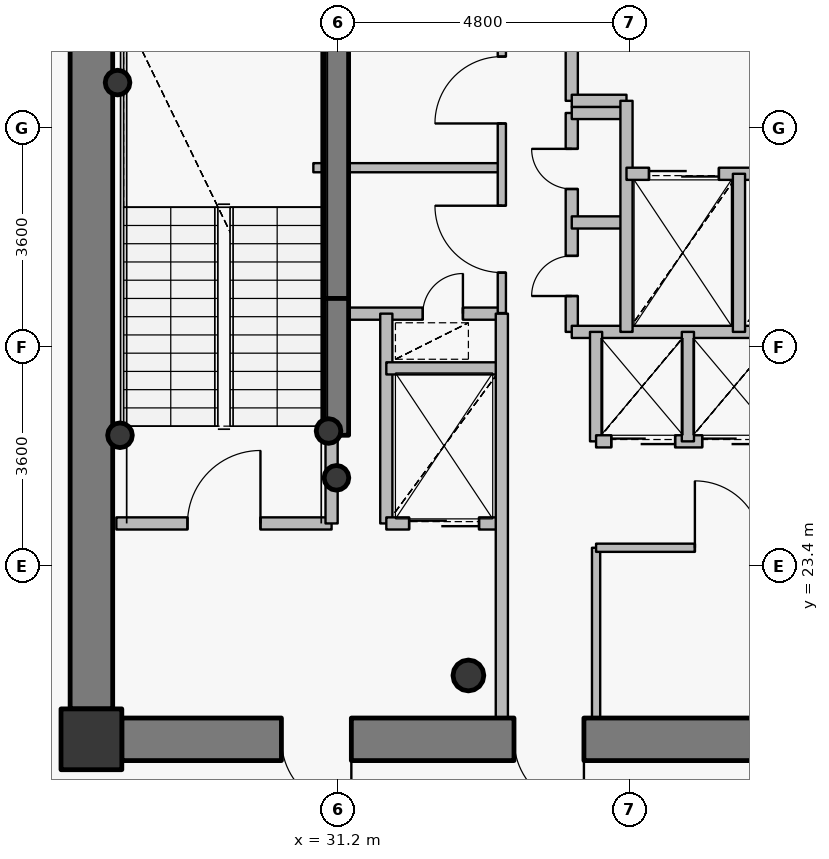
"""IFC4 building model, lengths in metres.
Left out: names, types, materials, properties, quantities, classifications, styles, units other than length and angle.
Written with IfcOpenShell. Run it as: python <this file> out.ifc"""

import sys

from ifc_helpers import new_model, si_unit, direction, frame, frame_2d, origin, origin_2d, place, context, subcontext, project, spatial, rectangle, hollow_circle, extrude, source, transform, mapped, element, fill, save


model = new_model("IFC4")
c1 = context("Model", 3, precision=1e-05, world=origin(), true_north=direction((0.0, 1.0)))
c2 = subcontext(c1, "Body", "Model", "MODEL_VIEW")
j1 = project(units=[si_unit("LENGTHUNIT", "METRE"), si_unit("PLANEANGLEUNIT", "RADIAN")], contexts=[c1])
p1 = place(None, origin())
s1 = spatial("IfcSite", under=j1, at=p1, CompositionType="ELEMENT")
p2 = place(p1, origin())
s2 = spatial("IfcBuilding", under=s1, at=p2, CompositionType="ELEMENT")
p3 = place(p2, frame((0.0, 0.0, 314.25)))
s3 = spatial("IfcBuildingStorey", under=s2, at=p3, CompositionType="ELEMENT", Elevation=314.25)
p4 = place(p3, frame((27.15, 20.55, 0.0), z_axis=(0.0, 0.0, 1.0), x_axis=(1.0, 0.0, 0.0)))
e1 = element("IfcColumn", 1, at=p4, inside=s3, PredefinedType="COLUMN", context=c2, shape_type="SweptSolid", body=[
    extrude(rectangle(XDim=1.0, YDim=1.0, at=origin_2d()), origin(), (0.0, 0.0, 1.0), 3.75),
])
p5 = place(p3, frame((33.35, 21.6, 0.0), z_axis=(0.0, 0.0, 1.0), x_axis=(1.0, 0.0, 0.0)))
e2 = element("IfcColumn", 2, at=p5, inside=s3, PredefinedType="COLUMN", context=c2, shape_type="SweptSolid", body=[
    extrude(hollow_circle(Radius=0.254, WallThickness=0.02, at=origin_2d()), origin(), (0.0, 0.0, 1.0), 3.75),
])
p6 = place(p3, frame((31.18, 27.8, 0.0), z_axis=(0.0, 0.0, 1.0), x_axis=(0.0, 1.0, 0.0)))
e3 = element("IfcWall", 3, at=p6, inside=s3, PredefinedType="SHEAR", context=c2, shape_type="SweptSolid", body=[
    extrude(rectangle(XDim=4.75, YDim=0.4, at=frame_2d((2.375, 0.0))), origin(), (0.0, 0.0, 1.0), 3.75),
])
for number, where, z_axis, x_axis in (
    (4, (27.58, 31.35, 0.0), (0.0, 0.0, 1.0), (1.0, 0.0, 0.0)),
    (5, (31.05, 25.62, 0.0), (0.0, 0.0, 1.0), (1.0, 0.0, 0.0)),
    (6, (31.18, 24.85, 0.0), (0.0, 0.0, 1.0), (1.0, 0.0, 0.0)),
    (7, (27.62, 25.55, 0.0), (0.0, 0.0, 1.0), (1.0, 0.0, 0.0)),
):
    element("IfcColumn", number, at=place(p3, frame(where, z_axis=z_axis, x_axis=x_axis)), inside=s3, PredefinedType="COLUMN", context=c2, shape_type="SweptSolid", body=[
        extrude(hollow_circle(Radius=0.203, WallThickness=0.016, at=origin_2d()), origin(), (0.0, 0.0, 1.0), 3.75),
    ])
p7 = place(p3, frame((44.35, 20.55, 0.0), z_axis=(0.0, 0.0, 1.0), x_axis=(-1.0, 0.0, 0.0)))
e8 = element("IfcWall", 8, at=p7, inside=s3, PredefinedType="SHEAR", context=c2, shape_type="SweptSolid", body=[
    extrude(rectangle(XDim=16.7, YDim=0.7, at=frame_2d((8.35, 0.0))), origin(), (0.0, 0.0, 1.0), 3.0),
])
p8 = place(p7, frame((12.925, 0.0, 0.0)))
e9 = element("IfcOpeningElement", 9, at=p8, cuts=e8, PredefinedType="OPENING", context=c2, shape_type="SweptSolid", body=[
    extrude(rectangle(XDim=1.15, YDim=2.15, at=origin_2d()), frame((0.575, 0.36, 1.075), z_axis=(0.0, -1.0, 0.0), x_axis=(1.0, 0.0, 0.0)), (0.0, 0.0, 1.0), 0.72),
])
p9 = place(p7, frame((9.1, 0.0, 0.0)))
e10 = element("IfcOpeningElement", 10, at=p9, cuts=e8, PredefinedType="OPENING", context=c2, shape_type="SweptSolid", body=[
    extrude(rectangle(XDim=1.15, YDim=2.15, at=origin_2d()), frame((0.575, 0.36, 1.075), z_axis=(0.0, -1.0, 0.0), x_axis=(1.0, 0.0, 0.0)), (0.0, 0.0, 1.0), 0.72),
])
p10 = place(p3, frame((27.15, 21.05, 0.0), z_axis=(0.0, 0.0, 1.0), x_axis=(0.0, 1.0, 0.0)))
e11 = element("IfcWall", 11, at=p10, inside=s3, PredefinedType="SHEAR", context=c2, shape_type="SweptSolid", body=[
    extrude(rectangle(XDim=11.9, YDim=0.7, at=frame_2d((5.95, 0.0))), origin(), (0.0, 0.0, 1.0), 3.0),
])
p11 = place(p3, frame((31.18, 25.55, 0.0), z_axis=(0.0, 0.0, 1.0), x_axis=(0.0, 1.0, 0.0)))
e12 = element("IfcWall", 12, at=p11, inside=s3, PredefinedType="SHEAR", context=c2, shape_type="SweptSolid", body=[
    extrude(rectangle(XDim=2.25, YDim=0.4, at=frame_2d((1.125, 0.0))), origin(), (0.0, 0.0, 1.0), 3.05),
])
p12 = place(p3, frame((27.56, 24.1, 0.0), z_axis=(0.0, 0.0, 1.0), x_axis=(1.0, 0.0, 0.0)))
e13 = element("IfcWall", 13, at=p12, inside=s3, PredefinedType="PARTITIONING", context=c2, shape_type="SweptSolid", body=[
    extrude(rectangle(XDim=3.54, YDim=0.2, at=frame_2d((1.77, 0.0))), origin(), (0.0, 0.0, 1.0), 3.45),
])
p13 = place(p12, frame((1.17, 0.0, 0.0)))
e14 = element("IfcOpeningElement", 14, at=p13, cuts=e13, PredefinedType="OPENING", context=c2, shape_type="SweptSolid", body=[
    extrude(rectangle(XDim=1.2, YDim=2.15, at=origin_2d()), frame((0.6, 0.11, 1.075), z_axis=(0.0, -1.0, 0.0), x_axis=(1.0, 0.0, 0.0)), (0.0, 0.0, 1.0), 0.22),
])
p14 = place(p3, frame((30.8, 29.95, 0.0), z_axis=(0.0, 0.0, 1.0), x_axis=(1.0, 0.0, 0.0)))
e15 = element("IfcWall", 15, at=p14, inside=s3, PredefinedType="PARTITIONING", context=c2, shape_type="SweptSolid", body=[
    extrude(rectangle(XDim=3.1, YDim=0.15, at=frame_2d((1.55, 0.0))), origin(), (0.0, 0.0, 1.0), 3.035),
])
p15 = place(p3, frame((31.1, 24.1, 0.0), z_axis=(0.0, 0.0, 1.0), x_axis=(0.0, 1.0, 0.0)))
e16 = element("IfcWall", 16, at=p15, inside=s3, PredefinedType="PARTITIONING", context=c2, shape_type="SweptSolid", body=[
    extrude(rectangle(XDim=1.44, YDim=0.2, at=frame_2d((0.72, 0.0))), origin(), (0.0, 0.0, 1.0), 3.45),
])
p16 = place(p3, frame((31.1, 27.55, 0.0), z_axis=(0.0, 0.0, 1.0), x_axis=(1.0, 0.0, 0.0)))
e17 = element("IfcWall", 17, at=p16, inside=s3, PredefinedType="PARTITIONING", context=c2, shape_type="SweptSolid", body=[
    extrude(rectangle(XDim=2.8, YDim=0.2, at=frame_2d((1.4, 0.0))), origin(), (0.0, 0.0, 1.0), 3.035),
])
p17 = place(p16, frame((1.5, 0.0, 0.0)))
e18 = element("IfcOpeningElement", 18, at=p17, cuts=e17, PredefinedType="OPENING", context=c2, shape_type="SweptSolid", body=[
    extrude(rectangle(XDim=0.66, YDim=2.05, at=origin_2d()), frame((0.33, 0.11, 1.025), z_axis=(0.0, -1.0, 0.0), x_axis=(1.0, 0.0, 0.0)), (0.0, 0.0, 1.0), 0.22),
])
p18 = place(p3, frame((32.0, 24.1, 0.0), z_axis=(0.0, 0.0, 1.0), x_axis=(0.0, 1.0, 0.0)))
e19 = element("IfcWall", 19, at=p18, inside=s3, PredefinedType="PARTITIONING", context=c2, shape_type="SweptSolid", body=[
    extrude(rectangle(XDim=3.45, YDim=0.2, at=frame_2d((1.725, 0.0))), origin(), (0.0, 0.0, 1.0), 3.45),
])
p19 = place(p3, frame((32.0, 24.1, 0.0), z_axis=(0.0, 0.0, 1.0), x_axis=(1.0, 0.0, 0.0)))
e20 = element("IfcWall", 20, at=p19, inside=s3, PredefinedType="PARTITIONING", context=c2, shape_type="SweptSolid", body=[
    extrude(rectangle(XDim=1.9, YDim=0.2, at=frame_2d((0.95, 0.0))), origin(), (0.0, 0.0, 1.0), 3.035),
])
p20 = place(p19, frame((0.375, 0.0, 0.0)))
e21 = element("IfcOpeningElement", 21, at=p20, cuts=e20, PredefinedType="OPENING", context=c2, shape_type="SweptSolid", body=[
    extrude(rectangle(XDim=1.15, YDim=2.15, at=origin_2d()), frame((0.575, 0.11, 1.075), z_axis=(0.0, -1.0, 0.0), x_axis=(1.0, 0.0, 0.0)), (0.0, 0.0, 1.0), 0.22),
])
p21 = place(p3, frame((32.0, 26.65, 0.0), z_axis=(0.0, 0.0, 1.0), x_axis=(1.0, 0.0, 0.0)))
e22 = element("IfcWall", 22, at=p21, inside=s3, PredefinedType="PARTITIONING", context=c2, shape_type="SweptSolid", body=[
    extrude(rectangle(XDim=1.9, YDim=0.2, at=frame_2d((0.95, 0.0))), origin(), (0.0, 0.0, 1.0), 3.035),
])
p22 = place(p3, frame((33.9, 20.9, 0.0), z_axis=(0.0, 0.0, 1.0), x_axis=(0.0, 1.0, 0.0)))
e23 = element("IfcWall", 23, at=p22, inside=s3, PredefinedType="PARTITIONING", context=c2, shape_type="SweptSolid", body=[
    extrude(rectangle(XDim=6.65, YDim=0.2, at=frame_2d((3.325, 0.0))), origin(), (0.0, 0.0, 1.0), 3.035),
])
p23 = place(p3, frame((33.9, 27.56, 0.0), z_axis=(0.0, 0.0, 1.0), x_axis=(0.0, 1.0, 0.0)))
e24 = element("IfcWall", 24, at=p23, inside=s3, PredefinedType="PARTITIONING", context=c2, shape_type="SweptSolid", body=[
    extrude(rectangle(XDim=5.54, YDim=0.135, at=frame_2d((2.77, 0.0))), origin(), (0.0, 0.0, 1.0), 3.035),
])
p24 = place(p23, frame((0.665, 0.0, 0.0)))
e25 = element("IfcOpeningElement", 25, at=p24, cuts=e24, PredefinedType="OPENING", context=c2, shape_type="SweptSolid", body=[
    extrude(rectangle(XDim=1.1, YDim=2.15, at=origin_2d()), frame((0.55, 0.078, 1.075), z_axis=(0.0, -1.0, 0.0), x_axis=(1.0, 0.0, 0.0)), (0.0, 0.0, 1.0), 0.155),
])
p25 = place(p23, frame((3.117, 0.0, 0.0)))
e26 = element("IfcOpeningElement", 26, at=p25, cuts=e24, PredefinedType="OPENING", context=c2, shape_type="SweptSolid", body=[
    extrude(rectangle(XDim=1.1, YDim=2.15, at=origin_2d()), frame((0.55, 0.078, 1.075), z_axis=(0.0, -1.0, 0.0), x_axis=(1.0, 0.0, 0.0)), (0.0, 0.0, 1.0), 0.155),
])
p26 = place(p3, frame((35.05, 27.25, 0.0), z_axis=(0.0, 0.0, 1.0), x_axis=(0.0, 1.0, 0.0)))
e27 = element("IfcWall", 27, at=p26, inside=s3, PredefinedType="PARTITIONING", context=c2, shape_type="SweptSolid", body=[
    extrude(rectangle(XDim=3.6, YDim=0.2, at=frame_2d((1.8, 0.0))), origin(), (0.0, 0.0, 1.0), 3.45),
])
p27 = place(p26, frame((0.59, 0.0, 0.0)))
e28 = element("IfcOpeningElement", 28, at=p27, cuts=e27, PredefinedType="OPENING", context=c2, shape_type="SweptSolid", body=[
    extrude(rectangle(XDim=0.66, YDim=2.05, at=origin_2d()), frame((0.33, 0.11, 1.025), z_axis=(0.0, -1.0, 0.0), x_axis=(1.0, 0.0, 0.0)), (0.0, 0.0, 1.0), 0.22),
])
p28 = place(p26, frame((2.35, 0.0, 0.0)))
e29 = element("IfcOpeningElement", 29, at=p28, cuts=e27, PredefinedType="OPENING", context=c2, shape_type="SweptSolid", body=[
    extrude(rectangle(XDim=0.66, YDim=2.05, at=origin_2d()), frame((0.33, 0.11, 1.025), z_axis=(0.0, -1.0, 0.0), x_axis=(1.0, 0.0, 0.0)), (0.0, 0.0, 1.0), 0.22),
])
p29 = place(p3, frame((35.05, 27.25, 0.0), z_axis=(0.0, 0.0, 1.0), x_axis=(1.0, 0.0, 0.0)))
e30 = element("IfcWall", 30, at=p29, inside=s3, PredefinedType="PARTITIONING", context=c2, shape_type="SweptSolid", body=[
    extrude(rectangle(XDim=4.95, YDim=0.2, at=frame_2d((2.475, 0.0))), origin(), (0.0, 0.0, 1.0), 3.035),
])
for number, where, z_axis, x_axis in (
    (31, (35.05, 29.05, 0.0), (0.0, 0.0, 1.0), (1.0, 0.0, 0.0)),
    (32, (35.05, 30.85, 0.0), (0.0, 0.0, 1.0), (1.0, 0.0, 0.0)),
):
    element("IfcWall", number, at=place(p3, frame(where, z_axis=z_axis, x_axis=x_axis)), inside=s3, PredefinedType="PARTITIONING", context=c2, shape_type="SweptSolid", body=[
        extrude(rectangle(XDim=0.9, YDim=0.2, at=frame_2d((0.45, 0.0))), origin(), (0.0, 0.0, 1.0), 3.45),
    ])
p30 = place(p3, frame((35.05, 31.05, 0.0), z_axis=(0.0, 0.0, 1.0), x_axis=(0.0, 1.0, 0.0)))
e33 = element("IfcWall", 33, at=p30, inside=s3, PredefinedType="PARTITIONING", context=c2, shape_type="SweptSolid", body=[
    extrude(rectangle(XDim=2.05, YDim=0.2, at=frame_2d((1.025, 0.0))), origin(), (0.0, 0.0, 1.0), 3.035),
])
p31 = place(p3, frame((35.05, 31.05, 0.0), z_axis=(0.0, 0.0, 1.0), x_axis=(1.0, 0.0, 0.0)))
e34 = element("IfcWall", 34, at=p31, inside=s3, PredefinedType="PARTITIONING", context=c2, shape_type="SweptSolid", body=[
    extrude(rectangle(XDim=0.9, YDim=0.2, at=frame_2d((0.45, 0.0))), origin(), (0.0, 0.0, 1.0), 3.45),
])
p32 = place(p3, frame((35.45, 20.9, 0.0), z_axis=(0.0, 0.0, 1.0), x_axis=(0.0, 1.0, 0.0)))
e35 = element("IfcWall", 35, at=p32, inside=s3, PredefinedType="PARTITIONING", context=c2, shape_type="SweptSolid", body=[
    extrude(rectangle(XDim=2.8, YDim=0.135, at=frame_2d((1.4, 0.0))), origin(), (0.0, 0.0, 1.0), 3.035),
])
p33 = place(p3, frame((35.45, 23.7, 0.0), z_axis=(0.0, 0.0, 1.0), x_axis=(1.0, 0.0, 0.0)))
e36 = element("IfcWall", 36, at=p33, inside=s3, PredefinedType="PARTITIONING", context=c2, shape_type="SweptSolid", body=[
    extrude(rectangle(XDim=4.35, YDim=0.135, at=frame_2d((2.175, 0.0))), origin(), (0.0, 0.0, 1.0), 3.035),
])
p34 = place(p33, frame((1.625, 0.0, 0.0)))
e37 = element("IfcOpeningElement", 37, at=p34, cuts=e36, PredefinedType="OPENING", context=c2, shape_type="SweptSolid", body=[
    extrude(rectangle(XDim=1.1, YDim=2.15, at=origin_2d()), frame((0.55, 0.078, 1.075), z_axis=(0.0, -1.0, 0.0), x_axis=(1.0, 0.0, 0.0)), (0.0, 0.0, 1.0), 0.155),
])
p35 = place(p3, frame((35.45, 25.45, 0.0), z_axis=(0.0, 0.0, 1.0), x_axis=(0.0, 1.0, 0.0)))
e38 = element("IfcWall", 38, at=p35, inside=s3, PredefinedType="PARTITIONING", context=c2, shape_type="SweptSolid", body=[
    extrude(rectangle(XDim=1.8, YDim=0.2, at=frame_2d((0.9, 0.0))), origin(), (0.0, 0.0, 1.0), 3.45),
])
p36 = place(p3, frame((35.45, 25.45, 0.0), z_axis=(0.0, 0.0, 1.0), x_axis=(1.0, 0.0, 0.0)))
e39 = element("IfcWall", 39, at=p36, inside=s3, PredefinedType="PARTITIONING", context=c2, shape_type="SweptSolid", body=[
    extrude(rectangle(XDim=4.55, YDim=0.2, at=frame_2d((2.275, 0.0))), origin(), (0.0, 0.0, 1.0), 3.035),
])
p37 = place(p36, frame((0.25, 0.0, 0.0)))
e40 = element("IfcOpeningElement", 40, at=p37, cuts=e39, PredefinedType="OPENING", context=c2, shape_type="SweptSolid", body=[
    extrude(rectangle(XDim=1.05, YDim=2.15, at=origin_2d()), frame((0.525, 0.11, 1.075), z_axis=(0.0, -1.0, 0.0), x_axis=(1.0, 0.0, 0.0)), (0.0, 0.0, 1.0), 0.22),
])
p38 = place(p36, frame((1.745, 0.0, 0.0)))
e41 = element("IfcOpeningElement", 41, at=p38, cuts=e39, PredefinedType="OPENING", context=c2, shape_type="SweptSolid", body=[
    extrude(rectangle(XDim=1.05, YDim=2.15, at=origin_2d()), frame((0.525, 0.11, 1.075), z_axis=(0.0, -1.0, 0.0), x_axis=(1.0, 0.0, 0.0)), (0.0, 0.0, 1.0), 0.22),
])
p39 = place(p36, frame((3.165, 0.0, 0.0)))
e42 = element("IfcOpeningElement", 42, at=p39, cuts=e39, PredefinedType="OPENING", context=c2, shape_type="SweptSolid", body=[
    extrude(rectangle(XDim=1.05, YDim=2.15, at=origin_2d()), frame((0.525, 0.11, 1.075), z_axis=(0.0, -1.0, 0.0), x_axis=(1.0, 0.0, 0.0)), (0.0, 0.0, 1.0), 0.22),
])
p40 = place(p3, frame((35.95, 27.25, 0.0), z_axis=(0.0, 0.0, 1.0), x_axis=(0.0, 1.0, 0.0)))
e43 = element("IfcWall", 43, at=p40, inside=s3, PredefinedType="PARTITIONING", context=c2, shape_type="SweptSolid", body=[
    extrude(rectangle(XDim=3.8, YDim=0.2, at=frame_2d((1.9, 0.0))), origin(), (0.0, 0.0, 1.0), 3.45),
])
p41 = place(p3, frame((35.95, 29.85, 0.0), z_axis=(0.0, 0.0, 1.0), x_axis=(1.0, 0.0, 0.0)))
e44 = element("IfcWall", 44, at=p41, inside=s3, PredefinedType="PARTITIONING", context=c2, shape_type="SweptSolid", body=[
    extrude(rectangle(XDim=8.49, YDim=0.2, at=frame_2d((4.245, 0.0))), origin(), (0.0, 0.0, 1.0), 3.035),
])
p42 = place(p41, frame((6.1, 0.0, 0.0)))
e45 = element("IfcOpeningElement", 45, at=p42, cuts=e44, PredefinedType="OPENING", context=c2, shape_type="SweptSolid", body=[
    extrude(rectangle(XDim=1.2, YDim=2.15, at=origin_2d()), frame((0.6, 0.11, 1.075), z_axis=(0.0, -1.0, 0.0), x_axis=(1.0, 0.0, 0.0)), (0.0, 0.0, 1.0), 0.22),
])
p43 = place(p41, frame((0.37, 0.0, 0.0)))
e46 = element("IfcOpeningElement", 46, at=p43, cuts=e44, PredefinedType="OPENING", context=c2, shape_type="SweptSolid", body=[
    extrude(rectangle(XDim=1.15, YDim=2.15, at=origin_2d()), frame((0.575, 0.11, 1.075), z_axis=(0.0, -1.0, 0.0), x_axis=(1.0, 0.0, 0.0)), (0.0, 0.0, 1.0), 0.22),
])
p44 = place(p41, frame((2.425, 0.0, 0.0)))
e47 = element("IfcOpeningElement", 47, at=p44, cuts=e44, PredefinedType="OPENING", context=c2, shape_type="SweptSolid", body=[
    extrude(rectangle(XDim=1.05, YDim=2.15, at=origin_2d()), frame((0.525, 0.11, 1.075), z_axis=(0.0, -1.0, 0.0), x_axis=(1.0, 0.0, 0.0)), (0.0, 0.0, 1.0), 0.22),
])
p45 = place(p3, frame((36.96, 25.45, 0.0), z_axis=(0.0, 0.0, 1.0), x_axis=(0.0, 1.0, 0.0)))
e48 = element("IfcWall", 48, at=p45, inside=s3, PredefinedType="PARTITIONING", context=c2, shape_type="SweptSolid", body=[
    extrude(rectangle(XDim=1.8, YDim=0.2, at=frame_2d((0.9, 0.0))), origin(), (0.0, 0.0, 1.0), 3.45),
])
p46 = place(p3, frame((37.8, 27.25, 0.0), z_axis=(0.0, 0.0, 1.0), x_axis=(0.0, 1.0, 0.0)))
e49 = element("IfcWall", 49, at=p46, inside=s3, PredefinedType="PARTITIONING", context=c2, shape_type="SweptSolid", body=[
    extrude(rectangle(XDim=2.6, YDim=0.2, at=frame_2d((1.3, 0.0))), origin(), (0.0, 0.0, 1.0), 3.45),
])
p47 = place(p3, frame((26.8, 21.04, 0.0), z_axis=(0.0, 0.0, 1.0), x_axis=(0.0, -1.0, 0.0)))
e50 = element("IfcWall", 50, at=p47, inside=s3, PredefinedType="PARTITIONING", context=c2, shape_type="SweptSolid", body=[
    extrude(rectangle(XDim=0.84, YDim=0.135, at=frame_2d((0.42, 0.0))), origin(), (0.0, 0.0, 1.0), 2.985),
])
p48 = place(p3, frame((27.107, 20.2, 0.0), z_axis=(0.0, 0.0, 1.0), x_axis=(1.0, 0.0, 0.0)))
e51 = element("IfcWall", 51, at=p48, inside=s3, PredefinedType="PARTITIONING", context=c2, shape_type="SweptSolid", body=[
    extrude(rectangle(XDim=0.532, YDim=0.135, at=frame_2d((0.266, 0.0))), origin(), (0.0, 0.0, 1.0), 2.985),
])
m1 = source(origin(), c2, "Body", "SweptSolid", [
    extrude(rectangle(XDim=1.15, YDim=2.15, at=origin_2d()), frame((0.575, 0.025, 1.075), z_axis=(0.0, -1.0, 0.0), x_axis=(1.0, 0.0, 0.0)), (0.0, 0.0, 1.0), 0.05),
])
p49 = place(p8, origin())
e52 = element("IfcDoor", 52, at=p49, inside=s3, OperationType="SINGLE_SWING_LEFT", PredefinedType="DOOR", context=c2, shape_type="MappedRepresentation", body=[
    mapped(m1, transform((0.0, 0.0, 0.0), x_axis=(1.0, 0.0, 0.0), y_axis=(0.0, 1.0, 0.0), z_axis=(0.0, 0.0, 1.0), scale=1.0)),
])
fill(e9, e52)
p50 = place(p9, origin())
e53 = element("IfcDoor", 53, at=p50, inside=s3, OperationType="SINGLE_SWING_LEFT", PredefinedType="DOOR", context=c2, shape_type="MappedRepresentation", body=[
    mapped(m1, transform((0.0, 0.0, 0.0), x_axis=(1.0, 0.0, 0.0), y_axis=(0.0, 1.0, 0.0), z_axis=(0.0, 0.0, 1.0), scale=1.0)),
])
fill(e10, e53)
m2 = source(origin(), c2, "Body", "SweptSolid", [
    extrude(rectangle(XDim=1.2, YDim=2.15, at=origin_2d()), frame((0.6, 0.025, 1.075), z_axis=(0.0, -1.0, 0.0), x_axis=(1.0, 0.0, 0.0)), (0.0, 0.0, 1.0), 0.05),
])
p51 = place(p13, origin())
e54 = element("IfcDoor", 54, at=p51, inside=s3, OperationType="SINGLE_SWING_RIGHT", PredefinedType="DOOR", context=c2, shape_type="MappedRepresentation", body=[
    mapped(m2, transform((0.0, 0.0, 0.0), x_axis=(1.0, 0.0, 0.0), y_axis=(0.0, 1.0, 0.0), z_axis=(0.0, 0.0, 1.0), scale=1.0)),
])
fill(e14, e54)
m3 = source(origin(), c2, "Body", "SweptSolid", [
    extrude(rectangle(XDim=1.15, YDim=2.15, at=origin_2d()), frame((0.575, 0.025, 1.075), z_axis=(0.0, -1.0, 0.0), x_axis=(1.0, 0.0, 0.0)), (0.0, 0.0, 1.0), 0.05),
])
p52 = place(p43, origin())
e55 = element("IfcDoor", 55, at=p52, inside=s3, OperationType="DOUBLE_DOOR_SLIDING", PredefinedType="USERDEFINED", context=c2, shape_type="MappedRepresentation", body=[
    mapped(m3, transform((0.0, 0.0, 0.0), x_axis=(1.0, 0.0, 0.0), y_axis=(0.0, 1.0, 0.0), z_axis=(0.0, 0.0, 1.0), scale=1.0)),
])
fill(e46, e55)
p53 = place(p20, origin())
e56 = element("IfcDoor", 56, at=p53, inside=s3, OperationType="DOUBLE_DOOR_SLIDING", PredefinedType="USERDEFINED", context=c2, shape_type="MappedRepresentation", body=[
    mapped(m3, transform((0.0, 0.0, 0.0), x_axis=(1.0, 0.0, 0.0), y_axis=(0.0, 1.0, 0.0), z_axis=(0.0, 0.0, 1.0), scale=1.0)),
])
fill(e21, e56)
m4 = source(origin(), c2, "Body", "SweptSolid", [
    extrude(rectangle(XDim=1.05, YDim=2.15, at=origin_2d()), frame((0.525, 0.025, 1.075), z_axis=(0.0, -1.0, 0.0), x_axis=(1.0, 0.0, 0.0)), (0.0, 0.0, 1.0), 0.05),
])
p54 = place(p37, origin())
e57 = element("IfcDoor", 57, at=p54, inside=s3, OperationType="DOUBLE_DOOR_SLIDING", PredefinedType="USERDEFINED", context=c2, shape_type="MappedRepresentation", body=[
    mapped(m4, transform((0.0, 0.0, 0.0), x_axis=(1.0, 0.0, 0.0), y_axis=(0.0, 1.0, 0.0), z_axis=(0.0, 0.0, 1.0), scale=1.0)),
])
fill(e40, e57)
p55 = place(p38, origin())
e58 = element("IfcDoor", 58, at=p55, inside=s3, OperationType="DOUBLE_DOOR_SLIDING", PredefinedType="USERDEFINED", context=c2, shape_type="MappedRepresentation", body=[
    mapped(m4, transform((0.0, 0.0, 0.0), x_axis=(1.0, 0.0, 0.0), y_axis=(0.0, 1.0, 0.0), z_axis=(0.0, 0.0, 1.0), scale=1.0)),
])
fill(e41, e58)
m5 = source(origin(), c2, "Body", "SweptSolid", [
    extrude(rectangle(XDim=0.66, YDim=2.05, at=origin_2d()), frame((0.33, 0.025, 1.025), z_axis=(0.0, -1.0, 0.0), x_axis=(1.0, 0.0, 0.0)), (0.0, 0.0, 1.0), 0.05),
])
p56 = place(p27, origin())
e59 = element("IfcDoor", 59, at=p56, inside=s3, OperationType="SINGLE_SWING_LEFT", PredefinedType="USERDEFINED", context=c2, shape_type="MappedRepresentation", body=[
    mapped(m5, transform((0.0, 0.0, 0.0), x_axis=(1.0, 0.0, 0.0), y_axis=(0.0, 1.0, 0.0), z_axis=(0.0, 0.0, 1.0), scale=1.0)),
])
fill(e28, e59)
p57 = place(p28, origin())
e60 = element("IfcDoor", 60, at=p57, inside=s3, OperationType="SINGLE_SWING_RIGHT", PredefinedType="USERDEFINED", context=c2, shape_type="MappedRepresentation", body=[
    mapped(m5, transform((0.0, 0.0, 0.0), x_axis=(1.0, 0.0, 0.0), y_axis=(0.0, 1.0, 0.0), z_axis=(0.0, 0.0, 1.0), scale=1.0)),
])
fill(e29, e60)
m6 = source(origin(), c2, "Body", "SweptSolid", [
    extrude(rectangle(XDim=1.1, YDim=2.15, at=origin_2d()), frame((0.55, 0.025, 1.075), z_axis=(0.0, -1.0, 0.0), x_axis=(1.0, 0.0, 0.0)), (0.0, 0.0, 1.0), 0.05),
])
p58 = place(p34, origin())
e61 = element("IfcDoor", 61, at=p58, inside=s3, OperationType="SINGLE_SWING_LEFT", PredefinedType="DOOR", context=c2, shape_type="MappedRepresentation", body=[
    mapped(m6, transform((0.0, 0.0, 0.0), x_axis=(1.0, 0.0, 0.0), y_axis=(0.0, 1.0, 0.0), z_axis=(0.0, 0.0, 1.0), scale=1.0)),
])
fill(e37, e61)
p59 = place(p24, origin())
e62 = element("IfcDoor", 62, at=p59, inside=s3, OperationType="SINGLE_SWING_RIGHT", PredefinedType="DOOR", context=c2, shape_type="MappedRepresentation", body=[
    mapped(m6, transform((0.0, 0.0, 0.0), x_axis=(1.0, 0.0, 0.0), y_axis=(0.0, 1.0, 0.0), z_axis=(0.0, 0.0, 1.0), scale=1.0)),
])
fill(e25, e62)
p60 = place(p25, origin())
e63 = element("IfcDoor", 63, at=p60, inside=s3, OperationType="SINGLE_SWING_LEFT", PredefinedType="DOOR", context=c2, shape_type="MappedRepresentation", body=[
    mapped(m6, transform((0.0, 0.0, 0.0), x_axis=(1.0, 0.0, 0.0), y_axis=(0.0, 1.0, 0.0), z_axis=(0.0, 0.0, 1.0), scale=1.0)),
])
fill(e26, e63)
p61 = place(p17, origin())
e64 = element("IfcDoor", 64, at=p61, inside=s3, OperationType="SINGLE_SWING_RIGHT", PredefinedType="USERDEFINED", context=c2, shape_type="MappedRepresentation", body=[
    mapped(m5, transform((0.0, 0.0, 0.0), x_axis=(1.0, 0.0, 0.0), y_axis=(0.0, 1.0, 0.0), z_axis=(0.0, 0.0, 1.0), scale=1.0)),
])
fill(e18, e64)
save(model, sys.argv[1])
